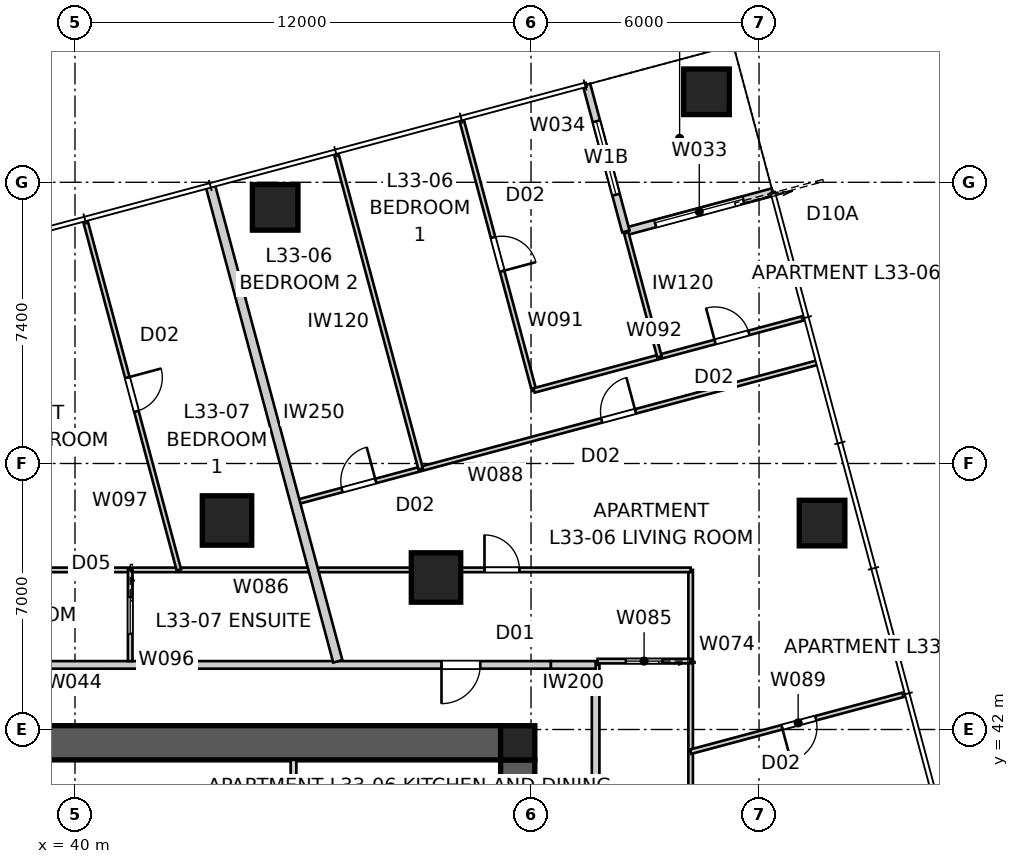
"""IFC4 building model, lengths in metres.
Left out: names, types, materials, properties, quantities, classifications, styles, units other than length and angle.
Written with IfcOpenShell. Run it as: python <this file> out.ifc"""

import sys

from ifc_helpers import new_model, si_unit, direction, frame, frame_2d, origin, origin_2d, place, context, subcontext, project, spatial, polyline, rectangle, outline, extrude, element, fill, save


model = new_model("IFC4")
c1 = context("Model", 3, precision=1e-05, world=origin(), true_north=direction((0.0, 1.0)))
c2 = subcontext(c1, "Body", "Model", "MODEL_VIEW")
j1 = project(units=[si_unit("LENGTHUNIT", "METRE"), si_unit("PLANEANGLEUNIT", "RADIAN")], contexts=[c1])
p1 = place(None, origin())
s1 = spatial("IfcSite", under=j1, at=p1, CompositionType="ELEMENT")
p2 = place(p1, origin())
s2 = spatial("IfcBuilding", under=s1, at=p2, CompositionType="ELEMENT")
p3 = place(p2, frame((0.0, 0.0, 121.8)))
s3 = spatial("IfcBuildingStorey", under=s2, at=p3, CompositionType="ELEMENT", Elevation=121.8)
p4 = place(p3, frame((28.8, 41.65, 0.0), z_axis=(0.0, 0.0, 1.0), x_axis=(1.0, 0.0, 0.0)))
e1 = element("IfcWall", 1, at=p4, inside=s3, PredefinedType="SHEAR", context=c2, shape_type="SweptSolid", body=[
    extrude(outline(polyline([(0.0, -0.45), (22.4, -0.45), (22.4, -0.025), (22.85, -0.025), (22.85, 0.025), (22.4, 0.025), (22.4, 0.45), (0.0, 0.45), (0.0, 0.025), (-0.45, 0.025), (-0.45, -0.025), (0.0, -0.025), (0.0, -0.45)])), origin(), (0.0, 0.0, 1.0), 3.4),
])
p5 = place(p3, frame((51.65, 18.8, 0.0), z_axis=(0.0, 0.0, 1.0), x_axis=(0.0, 1.0, 0.0)))
e2 = element("IfcWall", 2, at=p5, inside=s3, PredefinedType="SHEAR", context=c2, shape_type="SweptSolid", body=[
    extrude(outline(polyline([(0.0, -0.45), (22.4, -0.45), (22.4, -0.025), (22.85, -0.025), (22.85, 0.025), (22.4, 0.025), (22.4, 0.45), (0.0, 0.45), (0.0, 0.025), (-0.45, 0.025), (-0.45, -0.025), (0.0, -0.025), (0.0, -0.45)])), origin(), (0.0, 0.0, 1.0), 3.4),
])
p6 = place(p5, frame((11.14, 0.0, 0.0)))
e3 = element("IfcOpeningElement", 3, at=p6, cuts=e2, PredefinedType="OPENING", context=c2, shape_type="SweptSolid", body=[
    extrude(rectangle(XDim=1.02, YDim=2.4, at=frame_2d((0.51, 1.2))), frame((0.0, 0.46, 0.0), z_axis=(0.0, -1.0, 0.0), x_axis=(1.0, 0.0, 0.0)), (0.0, 0.0, 1.0), 0.92),
])
p7 = place(p3, frame((51.65, 41.65, 0.0), z_axis=(0.0, 0.0, 1.0), x_axis=(1.0, 0.0, 0.0)))
e4 = element("IfcColumn", 4, at=p7, inside=s3, PredefinedType="COLUMN", context=c2, shape_type="SweptSolid", body=[
    extrude(rectangle(XDim=0.9, YDim=0.9, at=origin_2d()), origin(), (0.0, 0.0, 1.0), 3.4),
])
for number, where, z_axis, x_axis in (
    (5, (59.658, 47.432, 0.0), (0.0, 0.0, 1.0), (1.0, 0.0, 0.0)),
    (6, (56.617, 58.781, 0.0), (0.0, 0.0, 1.0), (1.0, 0.0, 0.0)),
    (7, (45.267, 55.74, 0.0), (0.0, 0.0, 1.0), (1.0, 0.0, 0.0)),
):
    element("IfcColumn", number, at=place(p3, frame(where, z_axis=z_axis, x_axis=x_axis)), inside=s3, PredefinedType="COLUMN", context=c2, shape_type="SweptSolid", body=[
        extrude(rectangle(XDim=1.2, YDim=1.2, at=origin_2d()), origin(), (0.0, 0.0, 1.0), 3.4),
    ])
for number, where, z_axis, x_axis in (
    (8, (49.5, 46.0, 0.0), (0.0, 0.0, 1.0), (1.0, 0.0, 0.0)),
    (9, (44.0, 47.5, 0.0), (0.0, 0.0, 1.0), (1.0, 0.0, 0.0)),
):
    element("IfcColumn", number, at=place(p3, frame(where, z_axis=z_axis, x_axis=x_axis)), inside=s3, PredefinedType="COLUMN", context=c2, shape_type="SweptSolid", body=[
        extrude(rectangle(XDim=1.3, YDim=1.3, at=origin_2d()), origin(), (0.0, 0.0, 1.0), 3.4),
    ])
p8 = place(p3, frame((58.359, 56.143, 0.0), z_axis=(0.0, 0.0, 1.0), x_axis=(-0.965919172068, -0.258843877716, 0.0)))
e10 = element("IfcWall", 10, at=p8, inside=s3, PredefinedType="SOLIDWALL", context=c2, shape_type="SweptSolid", body=[
    extrude(rectangle(XDim=4.0, YDim=0.2, at=frame_2d((2.0, 0.0))), origin(), (0.0, 0.0, 1.0), 3.25),
])
p9 = place(p8, frame((0.8, 0.0, 0.0)))
e11 = element("IfcOpeningElement", 11, at=p9, cuts=e10, PredefinedType="OPENING", context=c2, shape_type="SweptSolid", body=[
    extrude(rectangle(XDim=2.4, YDim=2.1, at=frame_2d((1.2, 1.05))), frame((0.0, 0.11, 0.0), z_axis=(0.0, -1.0, 0.0), x_axis=(1.0, 0.0, 0.0)), (0.0, 0.0, 1.0), 0.22),
])
p10 = place(p3, frame((54.496, 55.107, 0.0), z_axis=(0.0, 0.0, 1.0), x_axis=(-0.258786931944, 0.965934430412, 0.0)))
e12 = element("IfcWall", 12, at=p10, inside=s3, PredefinedType="SOLIDWALL", context=c2, shape_type="SweptSolid", body=[
    extrude(rectangle(XDim=4.0, YDim=0.2, at=frame_2d((2.0, 0.0))), origin(), (0.0, 0.0, 1.0), 3.25),
])
p11 = place(p10, frame((1.0, 0.0, 0.45)))
e13 = element("IfcOpeningElement", 13, at=p11, cuts=e12, PredefinedType="OPENING", context=c2, shape_type="SweptSolid", body=[
    extrude(rectangle(XDim=2.0, YDim=1.8, at=frame_2d((1.0, 0.9))), frame((0.0, 0.11, 0.0), z_axis=(0.0, -1.0, 0.0), x_axis=(1.0, 0.0, 0.0)), (0.0, 0.0, 1.0), 0.22),
])
p12 = place(p3, frame((53.7, 17.48, 0.0), z_axis=(0.0, 0.0, 1.0), x_axis=(0.0, 1.0, 0.0)))
e14 = element("IfcWall", 14, at=p12, inside=s3, PredefinedType="PARTITIONING", context=c2, shape_type="SweptSolid", body=[
    extrude(rectangle(XDim=26.22, YDim=0.2, at=frame_2d((13.11, 0.0))), origin(), (0.0, 0.0, 1.0), 3.25),
])
p13 = place(p12, frame((2.252, 0.0, 0.0)))
e15 = element("IfcOpeningElement", 15, at=p13, cuts=e14, PredefinedType="OPENING", context=c2, shape_type="SweptSolid", body=[
    extrude(rectangle(XDim=1.02, YDim=2.34, at=frame_2d((0.51, 1.17))), frame((0.0, 0.11, 0.0), z_axis=(0.0, -1.0, 0.0), x_axis=(1.0, 0.0, 0.0)), (0.0, 0.0, 1.0), 0.22),
])
p14 = place(p12, frame((7.328, 0.0, 0.0)))
e16 = element("IfcOpeningElement", 16, at=p14, cuts=e14, PredefinedType="OPENING", context=c2, shape_type="SweptSolid", body=[
    extrude(rectangle(XDim=1.02, YDim=2.34, at=frame_2d((0.51, 1.17))), frame((0.0, 0.11, 0.0), z_axis=(0.0, -1.0, 0.0), x_axis=(1.0, 0.0, 0.0)), (0.0, 0.0, 1.0), 0.22),
])
p15 = place(p3, frame((53.7, 43.7, 0.0), z_axis=(0.0, 0.0, 1.0), x_axis=(-1.0, 0.0, 0.0)))
e17 = element("IfcWall", 17, at=p15, inside=s3, PredefinedType="PARTITIONING", context=c2, shape_type="SweptSolid", body=[
    extrude(rectangle(XDim=1.18, YDim=0.2, at=frame_2d((0.59, 0.0))), origin(), (0.0, 0.0, 1.0), 2.722),
])
p16 = place(p3, frame((52.52, 43.7, 0.0), z_axis=(0.0, 0.0, 1.0), x_axis=(-1.0, 0.0, 0.0)))
e18 = element("IfcWall", 18, at=p16, inside=s3, PredefinedType="PARTITIONING", context=c2, shape_type="SweptSolid", body=[
    extrude(rectangle(XDim=27.02, YDim=0.2, at=frame_2d((13.51, 0.0))), origin(), (0.0, 0.0, 1.0), 3.25),
])
p17 = place(p16, frame((22.208, 0.0, 0.0)))
e19 = element("IfcOpeningElement", 19, at=p17, cuts=e18, PredefinedType="OPENING", context=c2, shape_type="SweptSolid", body=[
    extrude(rectangle(XDim=1.02, YDim=2.34, at=frame_2d((0.51, 1.17))), frame((0.0, 0.11, 0.0), z_axis=(0.0, -1.0, 0.0), x_axis=(1.0, 0.0, 0.0)), (0.0, 0.0, 1.0), 0.22),
])
p18 = place(p16, frame((1.856, 0.0, 0.0)))
e20 = element("IfcOpeningElement", 20, at=p18, cuts=e18, PredefinedType="OPENING", context=c2, shape_type="SweptSolid", body=[
    extrude(rectangle(XDim=1.02, YDim=2.34, at=frame_2d((0.51, 1.17))), frame((0.0, 0.11, 0.0), z_axis=(0.0, -1.0, 0.0), x_axis=(1.0, 0.0, 0.0)), (0.0, 0.0, 1.0), 0.22),
])
p19 = place(p3, frame((43.56, 56.318, 0.0), z_axis=(0.0, 0.0, 1.0), x_axis=(0.258822671559, -0.965924854576, 0.0)))
e21 = element("IfcWall", 21, at=p19, inside=s3, PredefinedType="PARTITIONING", context=c2, shape_type="SweptSolid", body=[
    extrude(rectangle(XDim=12.966, YDim=0.25, at=frame_2d((6.483, 0.0))), origin(), (0.0, 0.0, 1.0), 3.25),
])
p20 = place(p3, frame((45.75, 41.2, 0.0), z_axis=(0.0, 0.0, 1.0), x_axis=(0.0, -1.0, 0.0)))
e22 = element("IfcWall", 22, at=p20, inside=s3, PredefinedType="SOLIDWALL", context=c2, shape_type="SweptSolid", body=[
    extrude(rectangle(XDim=5.9, YDim=0.15, at=frame_2d((2.95, 0.0))), origin(), (0.0, 0.0, 1.0), 3.25),
])
p21 = place(p3, frame((56.2, 46.2, 0.0), z_axis=(0.0, 0.0, 1.0), x_axis=(0.0, -1.0, 0.0)))
e23 = element("IfcWall", 23, at=p21, inside=s3, PredefinedType="PARTITIONING", context=c2, shape_type="SweptSolid", body=[
    extrude(rectangle(XDim=33.2, YDim=0.12, at=frame_2d((16.6, 0.0))), origin(), (0.0, 0.0, 1.0), 2.55),
])
p22 = place(p21, frame((23.955, 0.0, 0.0)))
e24 = element("IfcOpeningElement", 24, at=p22, cuts=e23, PredefinedType="OPENING", context=c2, shape_type="SweptSolid", body=[
    extrude(rectangle(XDim=0.92, YDim=2.34, at=frame_2d((0.46, 1.17))), frame((0.0, 0.07, 0.0), z_axis=(0.0, -1.0, 0.0), x_axis=(1.0, 0.0, 0.0)), (0.0, 0.0, 1.0), 0.14),
])
p23 = place(p21, frame((20.966, 0.0, 0.0)))
e25 = element("IfcOpeningElement", 25, at=p23, cuts=e23, PredefinedType="OPENING", context=c2, shape_type="SweptSolid", body=[
    extrude(rectangle(XDim=0.92, YDim=2.34, at=frame_2d((0.46, 1.17))), frame((0.0, 0.07, 0.0), z_axis=(0.0, -1.0, 0.0), x_axis=(1.0, 0.0, 0.0)), (0.0, 0.0, 1.0), 0.14),
])
p24 = place(p21, frame((13.174, 0.0, 0.0)))
e26 = element("IfcOpeningElement", 26, at=p24, cuts=e23, PredefinedType="OPENING", context=c2, shape_type="SweptSolid", body=[
    extrude(rectangle(XDim=0.96, YDim=2.1, at=frame_2d((0.48, 1.05))), frame((0.0, 0.07, 0.0), z_axis=(0.0, -1.0, 0.0), x_axis=(1.0, 0.0, 0.0)), (0.0, 0.0, 1.0), 0.14),
])
p25 = place(p3, frame((56.2, 43.8, 0.0), z_axis=(0.0, 0.0, 1.0), x_axis=(-1.0, 0.0, 0.0)))
e27 = element("IfcWall", 27, at=p25, inside=s3, PredefinedType="PARTITIONING", context=c2, shape_type="SweptSolid", body=[
    extrude(rectangle(XDim=2.45, YDim=0.12, at=frame_2d((1.225, 0.0))), origin(), (0.0, 0.0, 1.0), 2.722),
])
p26 = place(p25, frame((0.745, 0.0, 0.0)))
e28 = element("IfcOpeningElement", 28, at=p26, cuts=e27, PredefinedType="OPENING", context=c2, shape_type="SweptSolid", body=[
    extrude(rectangle(XDim=0.96, YDim=2.1, at=frame_2d((0.48, 1.05))), frame((0.0, 0.07, 0.0), z_axis=(0.0, -1.0, 0.0), x_axis=(1.0, 0.0, 0.0)), (0.0, 0.0, 1.0), 0.14),
])
p27 = place(p3, frame((23.0, 46.2, 0.0), z_axis=(0.0, 0.0, 1.0), x_axis=(1.0, 0.0, 0.0)))
e29 = element("IfcWall", 29, at=p27, inside=s3, PredefinedType="PARTITIONING", context=c2, shape_type="SweptSolid", body=[
    extrude(rectangle(XDim=33.2, YDim=0.12, at=frame_2d((16.6, 0.0))), origin(), (0.0, 0.0, 1.0), 2.55),
])
p28 = place(p27, frame((5.844, 0.0, 0.0)))
e30 = element("IfcOpeningElement", 30, at=p28, cuts=e29, PredefinedType="OPENING", context=c2, shape_type="SweptSolid", body=[
    extrude(rectangle(XDim=0.92, YDim=2.34, at=frame_2d((0.46, 1.17))), frame((0.0, 0.07, 0.0), z_axis=(0.0, -1.0, 0.0), x_axis=(1.0, 0.0, 0.0)), (0.0, 0.0, 1.0), 0.14),
])
p29 = place(p27, frame((3.382, 0.0, 0.0)))
e31 = element("IfcOpeningElement", 31, at=p29, cuts=e29, PredefinedType="OPENING", context=c2, shape_type="SweptSolid", body=[
    extrude(rectangle(XDim=0.92, YDim=2.34, at=frame_2d((0.46, 1.17))), frame((0.0, 0.07, 0.0), z_axis=(0.0, -1.0, 0.0), x_axis=(1.0, 0.0, 0.0)), (0.0, 0.0, 1.0), 0.14),
])
p30 = place(p27, frame((9.452, 0.0, 0.0)))
e32 = element("IfcOpeningElement", 32, at=p30, cuts=e29, PredefinedType="OPENING", context=c2, shape_type="SweptSolid", body=[
    extrude(rectangle(XDim=0.92, YDim=2.34, at=frame_2d((0.46, 1.17))), frame((0.0, 0.07, 0.0), z_axis=(0.0, -1.0, 0.0), x_axis=(1.0, 0.0, 0.0)), (0.0, 0.0, 1.0), 0.14),
])
p31 = place(p27, frame((27.775, 0.0, 0.0)))
e33 = element("IfcOpeningElement", 33, at=p31, cuts=e29, PredefinedType="OPENING", context=c2, shape_type="SweptSolid", body=[
    extrude(rectangle(XDim=0.92, YDim=2.34, at=frame_2d((0.46, 1.17))), frame((0.0, 0.07, 0.0), z_axis=(0.0, -1.0, 0.0), x_axis=(1.0, 0.0, 0.0)), (0.0, 0.0, 1.0), 0.14),
])
p32 = place(p27, frame((15.05, 0.0, 0.0)))
e34 = element("IfcOpeningElement", 34, at=p32, cuts=e29, PredefinedType="OPENING", context=c2, shape_type="SweptSolid", body=[
    extrude(rectangle(XDim=0.96, YDim=2.1, at=frame_2d((0.48, 1.05))), frame((0.0, 0.07, 0.0), z_axis=(0.0, -1.0, 0.0), x_axis=(1.0, 0.0, 0.0)), (0.0, 0.0, 1.0), 0.14),
])
p33 = place(p3, frame((45.796, 47.973, 0.0), z_axis=(0.0, 0.0, 1.0), x_axis=(0.965921975889, 0.258833414564, 0.0)))
e35 = element("IfcWall", 35, at=p33, inside=s3, PredefinedType="PARTITIONING", context=c2, shape_type="SweptSolid", body=[
    extrude(rectangle(XDim=14.21, YDim=0.12, at=frame_2d((7.105, 0.0))), origin(), (0.0, 0.0, 1.0), 3.25),
])
p34 = place(p33, frame((8.348, 0.0, 0.0)))
e36 = element("IfcOpeningElement", 36, at=p34, cuts=e35, PredefinedType="OPENING", context=c2, shape_type="SweptSolid", body=[
    extrude(rectangle(XDim=0.92, YDim=2.34, at=frame_2d((0.46, 1.17))), frame((0.0, 0.07, 0.0), z_axis=(0.0, -1.0, 0.0), x_axis=(1.0, 0.0, 0.0)), (0.0, 0.0, 1.0), 0.14),
])
p35 = place(p33, frame((1.273, 0.0, 0.0)))
e37 = element("IfcOpeningElement", 37, at=p35, cuts=e35, PredefinedType="OPENING", context=c2, shape_type="SweptSolid", body=[
    extrude(rectangle(XDim=0.92, YDim=2.34, at=frame_2d((0.46, 1.17))), frame((0.0, 0.07, 0.0), z_axis=(0.0, -1.0, 0.0), x_axis=(1.0, 0.0, 0.0)), (0.0, 0.0, 1.0), 0.14),
])
p36 = place(p3, frame((61.858, 42.931, 0.0), z_axis=(0.0, 0.0, 1.0), x_axis=(-0.965933354686, -0.258790947109, 0.0)))
e38 = element("IfcWall", 38, at=p36, inside=s3, PredefinedType="PARTITIONING", context=c2, shape_type="SweptSolid", body=[
    extrude(rectangle(XDim=5.857, YDim=0.12, at=frame_2d((2.929, 0.0))), origin(), (0.0, 0.0, 1.0), 3.25),
])
p37 = place(p36, frame((2.449, 0.0, 0.0)))
e39 = element("IfcOpeningElement", 39, at=p37, cuts=e38, PredefinedType="OPENING", context=c2, shape_type="SweptSolid", body=[
    extrude(rectangle(XDim=0.92, YDim=2.34, at=frame_2d((0.46, 1.17))), frame((0.0, 0.07, 0.0), z_axis=(0.0, -1.0, 0.0), x_axis=(1.0, 0.0, 0.0)), (0.0, 0.0, 1.0), 0.14),
])
p38 = place(p3, frame((49.096, 48.857, 0.0), z_axis=(0.0, 0.0, 1.0), x_axis=(-0.258800415469, 0.965930817892, 0.0)))
e40 = element("IfcWall", 40, at=p38, inside=s3, PredefinedType="PARTITIONING", context=c2, shape_type="SweptSolid", body=[
    extrude(rectangle(XDim=8.6, YDim=0.12, at=frame_2d((4.3, 0.0))), origin(), (0.0, 0.0, 1.0), 2.722),
])
p39 = place(p3, frame((50.17, 58.048, 0.0), z_axis=(0.0, 0.0, 1.0), x_axis=(0.258807770359, -0.965928847277, 0.0)))
e41 = element("IfcWall", 41, at=p39, inside=s3, PredefinedType="PARTITIONING", context=c2, shape_type="SweptSolid", body=[
    extrude(rectangle(XDim=7.377, YDim=0.12, at=frame_2d((3.688, 0.0))), origin(), (0.0, 0.0, 1.0), 3.25),
])
p40 = place(p39, frame((3.208, 0.0, 0.0)))
e42 = element("IfcOpeningElement", 42, at=p40, cuts=e41, PredefinedType="OPENING", context=c2, shape_type="SweptSolid", body=[
    extrude(rectangle(XDim=0.92, YDim=2.34, at=frame_2d((0.46, 1.17))), frame((0.0, 0.07, 0.0), z_axis=(0.0, -1.0, 0.0), x_axis=(1.0, 0.0, 0.0)), (0.0, 0.0, 1.0), 0.14),
])
p41 = place(p3, frame((52.08, 50.923, 0.0), z_axis=(0.0, 0.0, 1.0), x_axis=(0.965920573283, 0.258838648792, 0.0)))
e43 = element("IfcWall", 43, at=p41, inside=s3, PredefinedType="PARTITIONING", context=c2, shape_type="SweptSolid", body=[
    extrude(rectangle(XDim=7.377, YDim=0.12, at=frame_2d((3.688, 0.0))), origin(), (0.0, 0.0, 1.0), 3.25),
])
p42 = place(p41, frame((4.932, 0.0, 0.0)))
e44 = element("IfcOpeningElement", 44, at=p42, cuts=e43, PredefinedType="OPENING", context=c2, shape_type="SweptSolid", body=[
    extrude(rectangle(XDim=0.92, YDim=2.34, at=frame_2d((0.46, 1.17))), frame((0.0, 0.07, 0.0), z_axis=(0.0, -1.0, 0.0), x_axis=(1.0, 0.0, 0.0)), (0.0, 0.0, 1.0), 0.14),
])
p43 = place(p3, frame((54.506, 55.069, 0.0), z_axis=(0.0, 0.0, 1.0), x_axis=(0.258783069815, -0.96593546512, 0.0)))
e45 = element("IfcWall", 45, at=p43, inside=s3, PredefinedType="PARTITIONING", context=c2, shape_type="SweptSolid", body=[
    extrude(rectangle(XDim=3.376, YDim=0.12, at=frame_2d((1.688, 0.0))), origin(), (0.0, 0.0, 1.0), 3.25),
])
p44 = place(p3, frame((41.453, 46.2, 0.0), z_axis=(0.0, 0.0, 1.0), x_axis=(0.0, -1.0, 0.0)))
e46 = element("IfcWall", 46, at=p44, inside=s3, PredefinedType="PARTITIONING", context=c2, shape_type="SweptSolid", body=[
    extrude(rectangle(XDim=2.4, YDim=0.12, at=frame_2d((1.2, 0.0))), origin(), (0.0, 0.0, 1.0), 3.25),
])
p45 = place(p44, frame((0.72, 0.0, 0.0)))
e47 = element("IfcOpeningElement", 47, at=p45, cuts=e46, PredefinedType="OPENING", context=c2, shape_type="SweptSolid", body=[
    extrude(rectangle(XDim=0.96, YDim=2.1, at=frame_2d((0.48, 1.05))), frame((0.0, 0.07, 0.0), z_axis=(0.0, -1.0, 0.0), x_axis=(1.0, 0.0, 0.0)), (0.0, 0.0, 1.0), 0.14),
])
p46 = place(p3, frame((40.27, 55.395, 0.0), z_axis=(0.0, 0.0, 1.0), x_axis=(0.25881812666, -0.965926072385, 0.0)))
e48 = element("IfcWall", 48, at=p46, inside=s3, PredefinedType="PARTITIONING", context=c2, shape_type="SweptSolid", body=[
    extrude(rectangle(XDim=9.52, YDim=0.12, at=frame_2d((4.76, 0.0))), origin(), (0.0, 0.0, 1.0), 3.25),
])
p47 = place(p46, frame((4.28, 0.0, 0.0)))
e49 = element("IfcOpeningElement", 49, at=p47, cuts=e48, PredefinedType="OPENING", context=c2, shape_type="SweptSolid", body=[
    extrude(rectangle(XDim=0.92, YDim=2.34, at=frame_2d((0.46, 1.17))), frame((0.0, 0.07, 0.0), z_axis=(0.0, -1.0, 0.0), x_axis=(1.0, 0.0, 0.0)), (0.0, 0.0, 1.0), 0.14),
])
p48 = place(p9, origin())
e50 = element("IfcDoor", 50, at=p48, inside=s3, OperationType="SLIDING_TO_LEFT", PredefinedType="DOOR", context=c2, shape_type="SweptSolid", body=[
    extrude(rectangle(XDim=2.4, YDim=2.1, at=frame_2d((1.2, 1.05))), frame((0.0, 0.025, 0.0), z_axis=(0.0, -1.0, 0.0), x_axis=(1.0, 0.0, 0.0)), (0.0, 0.0, 1.0), 0.05),
])
fill(e11, e50)
p49 = place(p11, origin())
e51 = element("IfcWindow", 51, at=p49, inside=s3, PartitioningType="SINGLE_PANEL", PredefinedType="WINDOW", context=c2, shape_type="SweptSolid", body=[
    extrude(rectangle(XDim=2.0, YDim=1.8, at=frame_2d((1.0, 0.9))), frame((0.0, 0.03, 0.0), z_axis=(0.0, -1.0, 0.0), x_axis=(1.0, 0.0, 0.0)), (0.0, 0.0, 1.0), 0.06),
])
fill(e13, e51)
p50 = place(p18, origin())
e52 = element("IfcDoor", 52, at=p50, inside=s3, OperationType="SINGLE_SWING_RIGHT", PredefinedType="DOOR", context=c2, shape_type="SweptSolid", body=[
    extrude(rectangle(XDim=1.02, YDim=2.34, at=frame_2d((0.51, 1.17))), frame((0.0, 0.025, 0.0), z_axis=(0.0, -1.0, 0.0), x_axis=(1.0, 0.0, 0.0)), (0.0, 0.0, 1.0), 0.05),
])
fill(e20, e52)
p51 = place(p31, origin())
e53 = element("IfcDoor", 53, at=p51, inside=s3, OperationType="SINGLE_SWING_LEFT", PredefinedType="DOOR", context=c2, shape_type="SweptSolid", body=[
    extrude(rectangle(XDim=0.92, YDim=2.34, at=frame_2d((0.46, 1.17))), frame((0.0, 0.025, 0.0), z_axis=(0.0, -1.0, 0.0), x_axis=(1.0, 0.0, 0.0)), (0.0, 0.0, 1.0), 0.05),
])
fill(e33, e53)
p52 = place(p26, origin())
e54 = element("IfcDoor", 54, at=p52, inside=s3, OperationType="SLIDING_TO_LEFT", PredefinedType="DOOR", context=c2, shape_type="SweptSolid", body=[
    extrude(rectangle(XDim=0.96, YDim=2.1, at=frame_2d((0.48, 1.05))), frame((0.0, 0.025, 0.0), z_axis=(0.0, -1.0, 0.0), x_axis=(1.0, 0.0, 0.0)), (0.0, 0.0, 1.0), 0.05),
])
fill(e28, e54)
p53 = place(p45, origin())
e55 = element("IfcDoor", 55, at=p53, inside=s3, OperationType="SLIDING_TO_LEFT", PredefinedType="DOOR", context=c2, shape_type="SweptSolid", body=[
    extrude(rectangle(XDim=0.96, YDim=2.1, at=frame_2d((0.48, 1.05))), frame((0.0, 0.025, 0.0), z_axis=(0.0, -1.0, 0.0), x_axis=(1.0, 0.0, 0.0)), (0.0, 0.0, 1.0), 0.05),
])
fill(e47, e55)
p54 = place(p34, origin())
e56 = element("IfcDoor", 56, at=p54, inside=s3, OperationType="SINGLE_SWING_RIGHT", PredefinedType="DOOR", context=c2, shape_type="SweptSolid", body=[
    extrude(rectangle(XDim=0.92, YDim=2.34, at=frame_2d((0.46, 1.17))), frame((0.0, 0.025, 0.0), z_axis=(0.0, -1.0, 0.0), x_axis=(1.0, 0.0, 0.0)), (0.0, 0.0, 1.0), 0.05),
])
fill(e36, e56)
p55 = place(p37, origin())
e57 = element("IfcDoor", 57, at=p55, inside=s3, OperationType="SINGLE_SWING_RIGHT", PredefinedType="DOOR", context=c2, shape_type="SweptSolid", body=[
    extrude(rectangle(XDim=0.92, YDim=2.34, at=frame_2d((0.46, 1.17))), frame((0.0, 0.025, 0.0), z_axis=(0.0, -1.0, 0.0), x_axis=(1.0, 0.0, 0.0)), (0.0, 0.0, 1.0), 0.05),
])
fill(e39, e57)
p56 = place(p35, origin())
e58 = element("IfcDoor", 58, at=p56, inside=s3, OperationType="SINGLE_SWING_RIGHT", PredefinedType="DOOR", context=c2, shape_type="SweptSolid", body=[
    extrude(rectangle(XDim=0.92, YDim=2.34, at=frame_2d((0.46, 1.17))), frame((0.0, 0.025, 0.0), z_axis=(0.0, -1.0, 0.0), x_axis=(1.0, 0.0, 0.0)), (0.0, 0.0, 1.0), 0.05),
])
fill(e37, e58)
p57 = place(p47, origin())
e59 = element("IfcDoor", 59, at=p57, inside=s3, OperationType="SINGLE_SWING_LEFT", PredefinedType="DOOR", context=c2, shape_type="SweptSolid", body=[
    extrude(rectangle(XDim=0.92, YDim=2.34, at=frame_2d((0.46, 1.17))), frame((0.0, 0.025, 0.0), z_axis=(0.0, -1.0, 0.0), x_axis=(1.0, 0.0, 0.0)), (0.0, 0.0, 1.0), 0.05),
])
fill(e49, e59)
p58 = place(p40, origin())
e60 = element("IfcDoor", 60, at=p58, inside=s3, OperationType="SINGLE_SWING_RIGHT", PredefinedType="DOOR", context=c2, shape_type="SweptSolid", body=[
    extrude(rectangle(XDim=0.92, YDim=2.34, at=frame_2d((0.46, 1.17))), frame((0.0, 0.025, 0.0), z_axis=(0.0, -1.0, 0.0), x_axis=(1.0, 0.0, 0.0)), (0.0, 0.0, 1.0), 0.05),
])
fill(e42, e60)
p59 = place(p42, origin())
e61 = element("IfcDoor", 61, at=p59, inside=s3, OperationType="SINGLE_SWING_LEFT", PredefinedType="DOOR", context=c2, shape_type="SweptSolid", body=[
    extrude(rectangle(XDim=0.92, YDim=2.34, at=frame_2d((0.46, 1.17))), frame((0.0, 0.025, 0.0), z_axis=(0.0, -1.0, 0.0), x_axis=(1.0, 0.0, 0.0)), (0.0, 0.0, 1.0), 0.05),
])
fill(e44, e61)
save(model, sys.argv[1])
